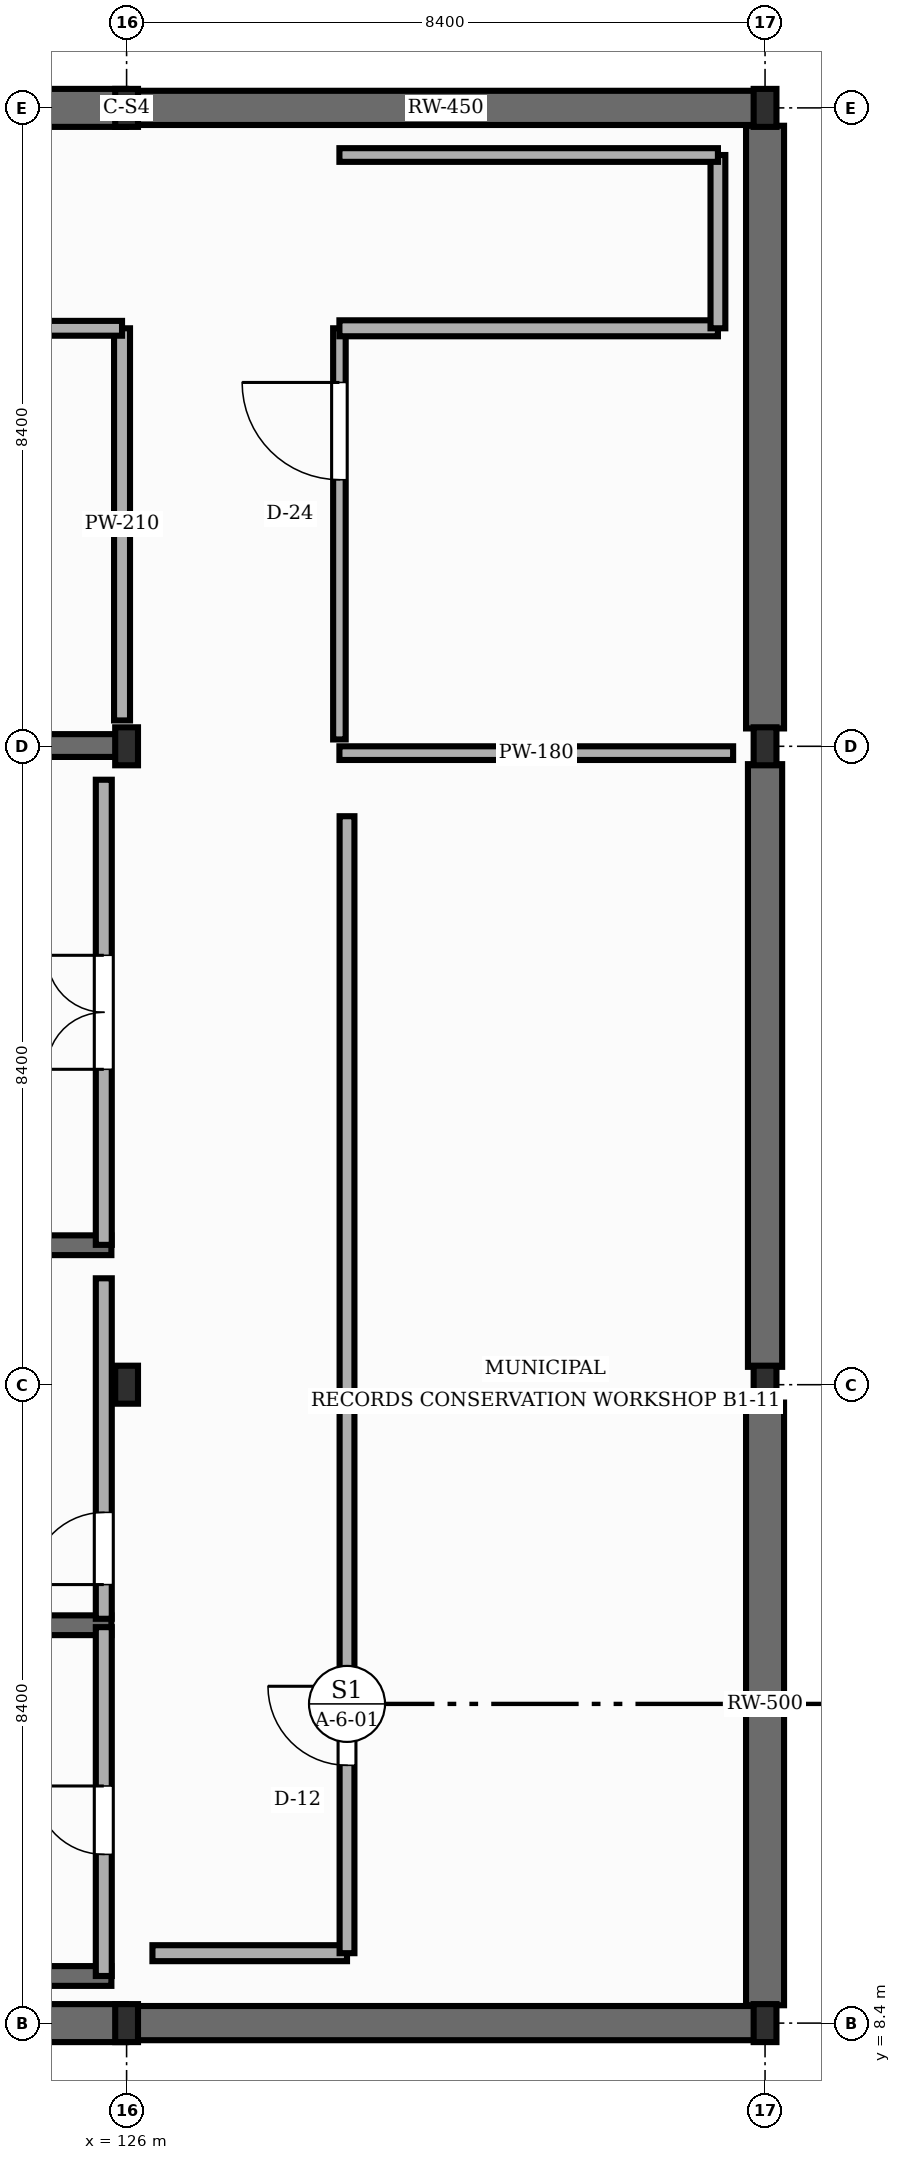
"""IFC4 building model, lengths in metres.
Left out: names, types, materials, properties, quantities, classifications, styles, units other than length and angle.
Written with IfcOpenShell. Run it as: python <this file> out.ifc"""

import sys

from ifc_helpers import new_model, si_unit, direction, frame, frame_2d, origin, origin_2d, place, context, subcontext, project, spatial, rectangle, i_section, extrude, element, fill, save


model = new_model("IFC4")
c1 = context("Model", 3, precision=1e-05, world=origin(), true_north=direction((0.0, 1.0)))
c2 = subcontext(c1, "Body", "Model", "MODEL_VIEW")
j1 = project(units=[si_unit("LENGTHUNIT", "METRE"), si_unit("PLANEANGLEUNIT", "RADIAN")], contexts=[c1])
p1 = place(None, origin())
s1 = spatial("IfcSite", under=j1, at=p1, CompositionType="ELEMENT")
p2 = place(p1, origin())
s2 = spatial("IfcBuilding", under=s1, at=p2, CompositionType="ELEMENT")
p3 = place(p2, frame((0.0, 0.0, -4.5)))
s3 = spatial("IfcBuildingStorey", under=s2, at=p3, CompositionType="ELEMENT", Elevation=-4.5)
for number, where, z_axis, x_axis in (
    (1, (126.0, 8.4, 0.0), (0.0, 0.0, 1.0), (1.0, 0.0, 0.0)),
    (2, (126.0, 16.8, 0.0), (0.0, 0.0, 1.0), (1.0, 0.0, 0.0)),
    (3, (126.0, 25.2, 0.0), (0.0, 0.0, 1.0), (1.0, 0.0, 0.0)),
    (4, (126.0, 33.6, 0.0), (0.0, 0.0, 1.0), (1.0, 0.0, 0.0)),
    (5, (134.4, 8.4, 0.0), (0.0, 0.0, 1.0), (1.0, 0.0, 0.0)),
    (6, (134.4, 16.8, 0.0), (0.0, 0.0, 1.0), (1.0, 0.0, 0.0)),
    (7, (134.4, 25.2, 0.0), (0.0, 0.0, 1.0), (1.0, 0.0, 0.0)),
    (8, (134.4, 33.6, 0.0), (0.0, 0.0, 1.0), (1.0, 0.0, 0.0)),
):
    element("IfcColumn", number, at=place(p3, frame(where, z_axis=z_axis, x_axis=x_axis)), inside=s3, PredefinedType="COLUMN", context=c2, shape_type="SweptSolid", body=[
        extrude(i_section(OverallWidth=0.3, OverallDepth=0.5, WebThickness=0.014, FlangeThickness=0.028, FilletRadius=0.027, at=origin_2d()), origin(), (0.0, 0.0, 1.0), 4.5),
    ])
p4 = place(p3, frame((134.392, 33.6, 0.0), z_axis=(0.0, 0.0, 1.0), x_axis=(-1.0, 0.0, 0.0)))
e9 = element("IfcWall", 9, at=p4, inside=s3, PredefinedType="USERDEFINED", context=c2, shape_type="SweptSolid", body=[
    extrude(rectangle(XDim=8.384, YDim=0.45, at=frame_2d((4.192, 0.0))), origin(), (0.0, 0.0, 1.0), 4.25),
])
for number, where, z_axis, x_axis in (
    (10, (125.992, 33.6, 0.0), (0.0, 0.0, 1.0), (-1.0, 0.0, 0.0)),
    (11, (117.608, 8.4, 0.0), (0.0, 0.0, 1.0), (1.0, 0.0, 0.0)),
):
    element("IfcWall", number, at=place(p3, frame(where, z_axis=z_axis, x_axis=x_axis)), inside=s3, PredefinedType="USERDEFINED", context=c2, shape_type="SweptSolid", body=[
        extrude(rectangle(XDim=8.384, YDim=0.5, at=frame_2d((4.192, 0.0))), origin(), (0.0, 0.0, 1.0), 4.25),
    ])
p5 = place(p3, frame((126.008, 8.4, 0.0), z_axis=(0.0, 0.0, 1.0), x_axis=(1.0, 0.0, 0.0)))
e12 = element("IfcWall", 12, at=p5, inside=s3, PredefinedType="USERDEFINED", context=c2, shape_type="SweptSolid", body=[
    extrude(rectangle(XDim=8.384, YDim=0.45, at=frame_2d((4.192, 0.0))), origin(), (0.0, 0.0, 1.0), 4.25),
])
p6 = place(p3, frame((134.4, 8.635, 0.0), z_axis=(0.0, 0.0, 1.0), x_axis=(0.0, 1.0, 0.0)))
e13 = element("IfcWall", 13, at=p6, inside=s3, PredefinedType="USERDEFINED", context=c2, shape_type="SweptSolid", body=[
    extrude(rectangle(XDim=7.93, YDim=0.5, at=frame_2d((3.965, 0.0))), origin(), (0.0, 0.0, 1.0), 4.25),
])
p7 = place(p3, frame((134.4, 17.035, 0.0), z_axis=(0.0, 0.0, 1.0), x_axis=(0.0, 1.0, 0.0)))
e14 = element("IfcWall", 14, at=p7, inside=s3, PredefinedType="USERDEFINED", context=c2, shape_type="SweptSolid", body=[
    extrude(rectangle(XDim=7.93, YDim=0.45, at=frame_2d((3.965, 0.0))), origin(), (0.0, 0.0, 1.0), 4.25),
])
p8 = place(p3, frame((134.4, 25.435, 0.0), z_axis=(0.0, 0.0, 1.0), x_axis=(0.0, 1.0, 0.0)))
e15 = element("IfcWall", 15, at=p8, inside=s3, PredefinedType="USERDEFINED", context=c2, shape_type="SweptSolid", body=[
    extrude(rectangle(XDim=7.93, YDim=0.5, at=frame_2d((3.965, 0.0))), origin(), (0.0, 0.0, 1.0), 4.25),
])
for number, where, z_axis, x_axis in (
    (16, (122.765, 9.02, 0.0), (0.0, 0.0, 1.0), (1.0, 0.0, 0.0)),
    (17, (122.765, 13.635, 0.0), (0.0, 0.0, 1.0), (1.0, 0.0, 0.0)),
    (18, (122.765, 18.635, 0.0), (0.0, 0.0, 1.0), (1.0, 0.0, 0.0)),
):
    element("IfcWall", number, at=place(p3, frame(where, z_axis=z_axis, x_axis=x_axis)), inside=s3, PredefinedType="SHEAR", context=c2, shape_type="SweptSolid", body=[
        extrude(rectangle(XDim=3.035, YDim=0.26, at=frame_2d((1.518, 0.0))), origin(), (0.0, 0.0, 1.0), 4.25),
    ])
p9 = place(p3, frame((121.15, 25.21, 0.0), z_axis=(0.0, 0.0, 1.0), x_axis=(1.0, 0.0, 0.0)))
e19 = element("IfcWall", 19, at=p9, inside=s3, PredefinedType="SHEAR", context=c2, shape_type="SweptSolid", body=[
    extrude(rectangle(XDim=4.87, YDim=0.3, at=frame_2d((2.435, 0.0))), origin(), (0.0, 0.0, 1.0), 4.25),
])
p10 = place(p3, frame((125.7, 9.02, 0.0), z_axis=(0.0, 0.0, 1.0), x_axis=(0.0, 1.0, 0.0)))
e20 = element("IfcWall", 20, at=p10, inside=s3, PredefinedType="STANDARD", context=c2, shape_type="SweptSolid", body=[
    extrude(rectangle(XDim=4.59, YDim=0.21, at=frame_2d((2.295, 0.0))), origin(), (0.0, 0.0, 1.0), 3.832),
])
p11 = place(p10, frame((1.6, 0.0, 0.0)))
e21 = element("IfcOpeningElement", 21, at=p11, cuts=e20, PredefinedType="OPENING", context=c2, shape_type="SweptSolid", body=[
    extrude(rectangle(XDim=0.9, YDim=2.1, at=frame_2d((0.45, 1.05))), frame((0.0, 0.115, 0.0), z_axis=(0.0, -1.0, 0.0), x_axis=(1.0, 0.0, 0.0)), (0.0, 0.0, 1.0), 0.23),
])
p12 = place(p3, frame((125.7, 13.72, 0.0), z_axis=(0.0, 0.0, 1.0), x_axis=(0.0, 1.0, 0.0)))
e22 = element("IfcWall", 22, at=p12, inside=s3, PredefinedType="STANDARD", context=c2, shape_type="SweptSolid", body=[
    extrude(rectangle(XDim=4.48, YDim=0.21, at=frame_2d((2.24, 0.0))), origin(), (0.0, 0.0, 1.0), 3.832),
])
p13 = place(p12, frame((0.45, 0.0, 0.0)))
e23 = element("IfcOpeningElement", 23, at=p13, cuts=e22, PredefinedType="OPENING", context=c2, shape_type="SweptSolid", body=[
    extrude(rectangle(XDim=0.95, YDim=2.15, at=frame_2d((0.475, 1.075))), frame((0.0, 0.115, 0.0), z_axis=(0.0, -1.0, 0.0), x_axis=(1.0, 0.0, 0.0)), (0.0, 0.0, 1.0), 0.23),
])
p14 = place(p3, frame((125.7, 18.64, 0.0), z_axis=(0.0, 0.0, 1.0), x_axis=(0.0, 1.0, 0.0)))
e24 = element("IfcWall", 24, at=p14, inside=s3, PredefinedType="STANDARD", context=c2, shape_type="SweptSolid", body=[
    extrude(rectangle(XDim=6.12, YDim=0.21, at=frame_2d((3.06, 0.0))), origin(), (0.0, 0.0, 1.0), 3.882),
])
p15 = place(p14, frame((2.31, 0.0, 0.0)))
e25 = element("IfcOpeningElement", 25, at=p15, cuts=e24, PredefinedType="OPENING", context=c2, shape_type="SweptSolid", body=[
    extrude(rectangle(XDim=1.5, YDim=2.2, at=frame_2d((0.75, 1.1))), frame((0.0, 0.115, 0.0), z_axis=(0.0, -1.0, 0.0), x_axis=(1.0, 0.0, 0.0)), (0.0, 0.0, 1.0), 0.23),
])
p16 = place(p3, frame((126.34, 9.32, -0.004), z_axis=(0.0, 0.0, 1.0), x_axis=(1.0, 0.0, 0.0)))
e26 = element("IfcWall", 26, at=p16, inside=s3, PredefinedType="STANDARD", context=c2, shape_type="SweptSolid", body=[
    extrude(rectangle(XDim=2.56, YDim=0.21, at=frame_2d((1.28, 0.0))), origin(), (0.0, 0.0, 1.0), 4.254),
])
p17 = place(p3, frame((128.9, 9.32, -0.004), z_axis=(0.0, 0.0, 1.0), x_axis=(0.0, 1.0, 0.0)))
e27 = element("IfcWall", 27, at=p17, inside=s3, PredefinedType="STANDARD", context=c2, shape_type="SweptSolid", body=[
    extrude(rectangle(XDim=14.96, YDim=0.195, at=frame_2d((7.48, 0.0))), origin(), (0.0, 0.0, 1.0), 3.966),
])
p18 = place(p17, frame((2.472, 0.0, 0.015)))
e28 = element("IfcOpeningElement", 28, at=p18, cuts=e27, PredefinedType="OPENING", context=c2, shape_type="SweptSolid", body=[
    extrude(rectangle(XDim=1.04, YDim=2.14, at=frame_2d((0.52, 1.07))), frame((0.0, 0.107, 0.0), z_axis=(0.0, -1.0, 0.0), x_axis=(1.0, 0.0, 0.0)), (0.0, 0.0, 1.0), 0.215),
])
p19 = place(p3, frame((128.8, 25.11, -0.004), z_axis=(0.0, 0.0, 1.0), x_axis=(1.0, 0.0, 0.0)))
e29 = element("IfcWall", 29, at=p19, inside=s3, PredefinedType="STANDARD", context=c2, shape_type="SweptSolid", body=[
    extrude(rectangle(XDim=5.18, YDim=0.18, at=frame_2d((2.59, 0.0))), origin(), (0.0, 0.0, 1.0), 3.846),
])
p20 = place(p3, frame((125.94, 30.7, -0.004), z_axis=(0.0, 0.0, 1.0), x_axis=(0.0, -1.0, 0.0)))
e30 = element("IfcWall", 30, at=p20, inside=s3, PredefinedType="STANDARD", context=c2, shape_type="SweptSolid", body=[
    extrude(rectangle(XDim=5.16, YDim=0.21, at=frame_2d((2.58, 0.0))), origin(), (0.0, 0.0, 1.0), 3.926),
])
p21 = place(p3, frame((117.69, 30.7, -0.004), z_axis=(0.0, 0.0, 1.0), x_axis=(1.0, 0.0, 0.0)))
e31 = element("IfcWall", 31, at=p21, inside=s3, PredefinedType="STANDARD", context=c2, shape_type="SweptSolid", body=[
    extrude(rectangle(XDim=8.25, YDim=0.195, at=frame_2d((4.125, 0.0))), origin(), (0.0, 0.0, 1.0), 4.254),
])
p22 = place(p21, frame((3.575, 0.0, 0.015)))
e32 = element("IfcOpeningElement", 32, at=p22, cuts=e31, PredefinedType="OPENING", context=c2, shape_type="SweptSolid", body=[
    extrude(rectangle(XDim=1.1, YDim=2.22, at=frame_2d((0.55, 1.11))), frame((0.0, 0.107, 0.0), z_axis=(0.0, -1.0, 0.0), x_axis=(1.0, 0.0, 0.0)), (0.0, 0.0, 1.0), 0.215),
])
p23 = place(p3, frame((128.8, 25.29, -0.004), z_axis=(0.0, 0.0, 1.0), x_axis=(0.0, 1.0, 0.0)))
e33 = element("IfcWall", 33, at=p23, inside=s3, PredefinedType="STANDARD", context=c2, shape_type="SweptSolid", body=[
    extrude(rectangle(XDim=5.41, YDim=0.165, at=frame_2d((2.705, 0.0))), origin(), (0.0, 0.0, 1.0), 4.016),
])
p24 = place(p23, frame((3.417, 0.0, 0.015)))
e34 = element("IfcOpeningElement", 34, at=p24, cuts=e33, PredefinedType="OPENING", context=c2, shape_type="SweptSolid", body=[
    extrude(rectangle(XDim=1.28, YDim=2.22, at=frame_2d((0.64, 1.11))), frame((0.0, 0.093, 0.0), z_axis=(0.0, -1.0, 0.0), x_axis=(1.0, 0.0, 0.0)), (0.0, 0.0, 1.0), 0.185),
])
p25 = place(p3, frame((128.8, 30.7, -0.004), z_axis=(0.0, 0.0, 1.0), x_axis=(1.0, 0.0, 0.0)))
e35 = element("IfcWall", 35, at=p25, inside=s3, PredefinedType="STANDARD", context=c2, shape_type="SweptSolid", body=[
    extrude(rectangle(XDim=4.98, YDim=0.21, at=frame_2d((2.49, 0.0))), origin(), (0.0, 0.0, 1.0), 4.254),
])
p26 = place(p3, frame((133.78, 30.7, -0.004), z_axis=(0.0, 0.0, 1.0), x_axis=(0.0, 1.0, 0.0)))
e36 = element("IfcWall", 36, at=p26, inside=s3, PredefinedType="STANDARD", context=c2, shape_type="SweptSolid", body=[
    extrude(rectangle(XDim=2.28, YDim=0.195, at=frame_2d((1.14, 0.0))), origin(), (0.0, 0.0, 1.0), 4.254),
])
p27 = place(p3, frame((133.78, 32.98, -0.004), z_axis=(0.0, 0.0, 1.0), x_axis=(-1.0, 0.0, 0.0)))
e37 = element("IfcWall", 37, at=p27, inside=s3, PredefinedType="STANDARD", context=c2, shape_type="SweptSolid", body=[
    extrude(rectangle(XDim=4.98, YDim=0.18, at=frame_2d((2.49, 0.0))), origin(), (0.0, 0.0, 1.0), 4.254),
])
p28 = place(p11, origin())
e38 = element("IfcDoor", 38, at=p28, inside=s3, OperationType="SINGLE_SWING_RIGHT", PredefinedType="DOOR", context=c2, shape_type="SweptSolid", body=[
    extrude(rectangle(XDim=0.9, YDim=2.1, at=frame_2d((0.45, 1.05))), frame((0.0, 0.025, 0.0), z_axis=(0.0, -1.0, 0.0), x_axis=(1.0, 0.0, 0.0)), (0.0, 0.0, 1.0), 0.05),
])
fill(e21, e38)
p29 = place(p13, origin())
e39 = element("IfcDoor", 39, at=p29, inside=s3, OperationType="SINGLE_SWING_LEFT", PredefinedType="DOOR", context=c2, shape_type="SweptSolid", body=[
    extrude(rectangle(XDim=0.95, YDim=2.15, at=frame_2d((0.475, 1.075))), frame((0.0, 0.025, 0.0), z_axis=(0.0, -1.0, 0.0), x_axis=(1.0, 0.0, 0.0)), (0.0, 0.0, 1.0), 0.05),
])
fill(e23, e39)
p30 = place(p15, origin())
e40 = element("IfcDoor", 40, at=p30, inside=s3, OperationType="DOUBLE_DOOR_SINGLE_SWING", PredefinedType="DOOR", context=c2, shape_type="SweptSolid", body=[
    extrude(rectangle(XDim=1.5, YDim=2.2, at=frame_2d((0.75, 1.1))), frame((0.0, 0.025, 0.0), z_axis=(0.0, -1.0, 0.0), x_axis=(1.0, 0.0, 0.0)), (0.0, 0.0, 1.0), 0.05),
])
fill(e25, e40)
p31 = place(p18, origin())
e41 = element("IfcDoor", 41, at=p31, inside=s3, OperationType="SINGLE_SWING_RIGHT", PredefinedType="DOOR", context=c2, shape_type="SweptSolid", body=[
    extrude(rectangle(XDim=1.04, YDim=2.14, at=frame_2d((0.52, 1.07))), frame((0.0, 0.025, 0.0), z_axis=(0.0, -1.0, 0.0), x_axis=(1.0, 0.0, 0.0)), (0.0, 0.0, 1.0), 0.05),
])
fill(e28, e41)
p32 = place(p24, origin())
e42 = element("IfcDoor", 42, at=p32, inside=s3, OperationType="SINGLE_SWING_RIGHT", PredefinedType="DOOR", context=c2, shape_type="SweptSolid", body=[
    extrude(rectangle(XDim=1.28, YDim=2.22, at=frame_2d((0.64, 1.11))), frame((0.0, 0.025, 0.0), z_axis=(0.0, -1.0, 0.0), x_axis=(1.0, 0.0, 0.0)), (0.0, 0.0, 1.0), 0.05),
])
fill(e34, e42)
save(model, sys.argv[1])
